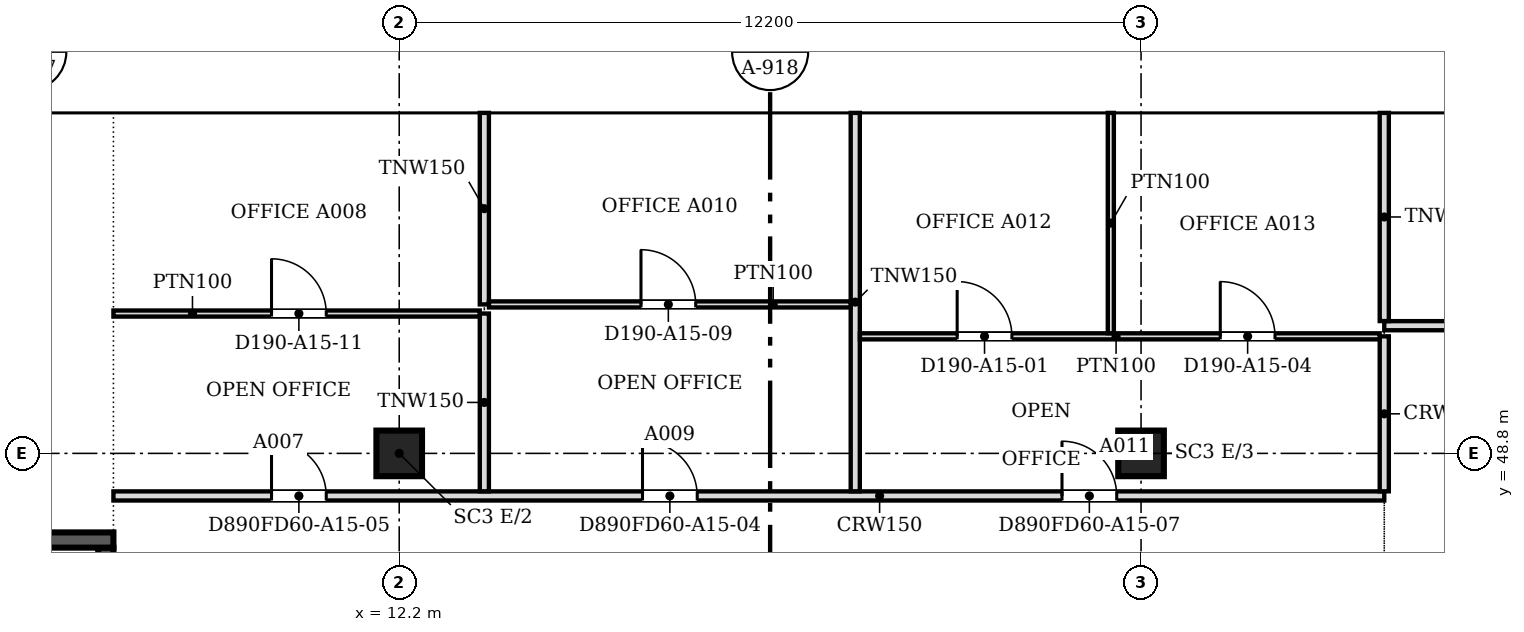
"""IFC4 building model, lengths in metres.
Left out: names, types, materials, properties, quantities, classifications, styles, units other than length and angle.
Written with IfcOpenShell. Run it as: python <this file> out.ifc"""

import sys

from ifc_helpers import new_model, si_unit, direction, frame, frame_2d, origin, origin_2d, place, context, subcontext, project, spatial, polyline, rectangle, outline, extrude, faceted_brep, source, transform, mapped, element, fill, save


model = new_model("IFC4")
c1 = context("Model", 3, precision=1e-05, world=origin(), true_north=direction((0.0, 1.0)))
c2 = subcontext(c1, "Body", "Model", "MODEL_VIEW")
j1 = project(units=[si_unit("LENGTHUNIT", "METRE"), si_unit("PLANEANGLEUNIT", "RADIAN")], contexts=[c1])
p1 = place(None, origin())
s1 = spatial("IfcSite", under=j1, at=p1, CompositionType="ELEMENT")
p2 = place(p1, origin())
s2 = spatial("IfcBuilding", under=s1, at=p2, CompositionType="ELEMENT")
p3 = place(p2, frame((0.0, 0.0, 170.6)))
s3 = spatial("IfcBuildingStorey", under=s2, at=p3, CompositionType="ELEMENT", Elevation=170.6)
for number, where, z_axis, x_axis in (
    (1, (12.2, 48.8, 0.0), (0.0, 0.0, 1.0), (1.0, 0.0, 0.0)),
    (2, (24.4, 48.8, 0.0), (0.0, 0.0, 1.0), (1.0, 0.0, 0.0)),
):
    element("IfcColumn", number, at=place(p3, frame(where, z_axis=z_axis, x_axis=x_axis)), inside=s3, PredefinedType="COLUMN", context=c2, shape_type="SweptSolid", body=[
        extrude(rectangle(XDim=0.75, YDim=0.75, at=origin_2d()), origin(), (0.0, 0.0, 1.0), 3.6),
    ])
m1 = source(origin(), c2, "Body", "SweptSolid", [
    extrude(outline(polyline([(3.05, 0.0), (6.1, 3.8), (3.05, 7.6), (0.0, 3.8), (3.05, 0.0)])), frame((0.0, 0.25, 0.0), z_axis=(0.0, -1.0, 0.0), x_axis=(1.0, 0.0, 0.0)), (0.0, 0.0, 1.0), 0.5),
])
p4 = place(p3, frame((33.55, 54.65, -3.8), z_axis=(0.0, 0.0, 1.0), x_axis=(-1.0, 0.0, 0.0)))
e3 = element("IfcWall", 3, at=p4, inside=s3, PredefinedType="SOLIDWALL", context=c2, shape_type="MappedRepresentation", body=[
    mapped(m1, transform((0.0, 0.0, 0.0), scale=1.0)),
])
m2 = source(origin(), c2, "Body", "SweptSolid", [
    extrude(outline(polyline([(3.05, 0.399), (5.78, 3.8), (3.05, 7.2), (0.321, 3.8), (3.05, 0.399)])), frame((0.0, 0.26, 0.0), z_axis=(0.0, -1.0, 0.0), x_axis=(1.0, 0.0, 0.0)), (0.0, 0.0, 1.0), 0.52),
])
p5 = place(p4, origin())
e4 = element("IfcOpeningElement", 4, at=p5, cuts=e3, PredefinedType="OPENING", context=c2, shape_type="MappedRepresentation", body=[
    mapped(m2, transform((0.0, 0.0, 0.0), scale=1.0)),
])
m3 = source(origin(), c2, "Body", "Brep", [
    faceted_brep([(3.05, -0.25, 0.0), (6.1, -0.25, 3.8), (6.1, -0.25, 3.8), (3.05, -0.25, 7.6), (0.0, -0.25, 3.8), (0.0, 0.25, 3.8), (3.05, 0.25, 7.6), (6.1, 0.25, 3.8), (6.1, 0.25, 3.8), (3.05, 0.25, 0.0)], [[[0, 1, 2, 3, 4]], [[5, 6, 7, 8, 9]], [[9, 8, 1, 0]], [[7, 6, 3, 2]], [[6, 5, 4, 3]], [[5, 9, 0, 4]], [[1, 8, 7, 2]]]),
])
p6 = place(p3, frame((27.45, 54.65, -3.8), z_axis=(0.0, 0.0, 1.0), x_axis=(-1.0, 0.0, 0.0)))
e5 = element("IfcWall", 5, at=p6, inside=s3, PredefinedType="SOLIDWALL", context=c2, shape_type="MappedRepresentation", body=[
    mapped(m3, transform((0.0, 0.0, 0.0), scale=1.0)),
])
p7 = place(p6, origin())
e6 = element("IfcOpeningElement", 6, at=p7, cuts=e5, PredefinedType="OPENING", context=c2, shape_type="MappedRepresentation", body=[
    mapped(m2, transform((0.0, 0.0, 0.0), scale=1.0)),
])
p8 = place(p3, frame((21.35, 54.65, -3.8), z_axis=(0.0, 0.0, 1.0), x_axis=(-1.0, 0.0, 0.0)))
e7 = element("IfcWall", 7, at=p8, inside=s3, PredefinedType="SOLIDWALL", context=c2, shape_type="MappedRepresentation", body=[
    mapped(m1, transform((0.0, 0.0, 0.0), scale=1.0)),
])
p9 = place(p8, origin())
e8 = element("IfcOpeningElement", 8, at=p9, cuts=e7, PredefinedType="OPENING", context=c2, shape_type="MappedRepresentation", body=[
    mapped(m2, transform((0.0, 0.0, 0.0), scale=1.0)),
])
p10 = place(p3, frame((15.25, 54.65, -3.8), z_axis=(0.0, 0.0, 1.0), x_axis=(-1.0, 0.0, 0.0)))
e9 = element("IfcWall", 9, at=p10, inside=s3, PredefinedType="SOLIDWALL", context=c2, shape_type="MappedRepresentation", body=[
    mapped(m1, transform((0.0, 0.0, 0.0), scale=1.0)),
])
p11 = place(p10, origin())
e10 = element("IfcOpeningElement", 10, at=p11, cuts=e9, PredefinedType="OPENING", context=c2, shape_type="MappedRepresentation", body=[
    mapped(m2, transform((0.0, 0.0, 0.0), scale=1.0)),
])
m4 = source(origin(), c2, "Body", "Brep", [
    faceted_brep([(3.003, -0.25, 0.0), (3.05, -0.25, 0.06), (3.05, -0.25, 7.54), (3.003, -0.25, 7.6), (0.0, -0.25, 3.8), (0.0, 0.25, 3.8), (2.957, 0.25, 7.541), (2.957, 0.25, 0.059), (3.003, 0.0, 0.0), (3.003, 0.0, 7.6)], [[[0, 1, 2, 3, 4]], [[5, 6, 7]], [[1, 0, 8]], [[9, 3, 2]], [[6, 5, 4, 3, 9]], [[5, 7, 8, 0, 4]], [[1, 8, 7, 6, 9, 2]]]),
])
p12 = place(p3, frame((9.15, 54.65, -3.8), z_axis=(0.0, 0.0, 1.0), x_axis=(-1.0, 0.0, 0.0)))
e11 = element("IfcWall", 11, at=p12, inside=s3, PredefinedType="SOLIDWALL", context=c2, shape_type="MappedRepresentation", body=[
    mapped(m4, transform((0.0, 0.0, 0.0), scale=1.0)),
])
m5 = source(origin(), c2, "Body", "SweptSolid", [
    extrude(outline(polyline([(2.803, 6.944), (0.319, 3.8), (2.803, 0.656), (2.803, 6.944)])), frame((0.0, 0.26, 0.0), z_axis=(0.0, -1.0, 0.0), x_axis=(1.0, 0.0, 0.0)), (0.0, 0.0, 1.0), 0.52),
])
p13 = place(p12, origin())
e12 = element("IfcOpeningElement", 12, at=p13, cuts=e11, PredefinedType="OPENING", context=c2, shape_type="MappedRepresentation", body=[
    mapped(m5, transform((0.0, 0.0, 0.0), scale=1.0)),
])
p14 = place(p2, frame((0.0, 0.0, 174.4)))
s4 = spatial("IfcBuildingStorey", under=s2, at=p14, CompositionType="ELEMENT", Elevation=174.4)
m6 = source(origin(), c2, "Body", "SweptSolid", [
    extrude(outline(polyline([(3.05, 0.0), (6.1, 3.8), (3.05, 7.6), (0.0, 3.8), (3.05, 0.0)])), frame((0.0, 0.25, 0.0), z_axis=(0.0, -1.0, 0.0), x_axis=(1.0, 0.0, 0.0)), (0.0, 0.0, 1.0), 0.5),
])
p15 = place(p14, frame((30.5, 54.65, -3.8), z_axis=(0.0, 0.0, 1.0), x_axis=(-1.0, 0.0, 0.0)))
e13 = element("IfcWall", 13, at=p15, inside=s4, PredefinedType="SOLIDWALL", context=c2, shape_type="MappedRepresentation", body=[
    mapped(m6, transform((0.0, 0.0, 0.0), scale=1.0)),
])
m7 = source(origin(), c2, "Body", "SweptSolid", [
    extrude(outline(polyline([(3.05, 0.399), (5.78, 3.8), (3.05, 7.2), (0.321, 3.8), (3.05, 0.399)])), frame((0.0, 0.26, 0.0), z_axis=(0.0, -1.0, 0.0), x_axis=(1.0, 0.0, 0.0)), (0.0, 0.0, 1.0), 0.52),
])
p16 = place(p15, origin())
e14 = element("IfcOpeningElement", 14, at=p16, cuts=e13, PredefinedType="OPENING", context=c2, shape_type="MappedRepresentation", body=[
    mapped(m7, transform((0.0, 0.0, 0.0), scale=1.0)),
])
m8 = source(origin(), c2, "Body", "Brep", [
    faceted_brep([(3.05, -0.25, 0.0), (6.1, -0.25, 3.8), (6.1, -0.25, 3.8), (3.05, -0.25, 7.6), (0.0, -0.25, 3.8), (0.0, 0.25, 3.8), (3.05, 0.25, 7.6), (6.1, 0.25, 3.8), (6.1, 0.25, 3.8), (3.05, 0.25, 0.0)], [[[0, 1, 2, 3, 4]], [[5, 6, 7, 8, 9]], [[9, 8, 1, 0]], [[7, 6, 3, 2]], [[6, 5, 4, 3]], [[5, 9, 0, 4]], [[1, 8, 7, 2]]]),
])
p17 = place(p14, frame((24.4, 54.65, -3.8), z_axis=(0.0, 0.0, 1.0), x_axis=(-1.0, 0.0, 0.0)))
e15 = element("IfcWall", 15, at=p17, inside=s4, PredefinedType="SOLIDWALL", context=c2, shape_type="MappedRepresentation", body=[
    mapped(m8, transform((0.0, 0.0, 0.0), scale=1.0)),
])
p18 = place(p17, origin())
e16 = element("IfcOpeningElement", 16, at=p18, cuts=e15, PredefinedType="OPENING", context=c2, shape_type="MappedRepresentation", body=[
    mapped(m7, transform((0.0, 0.0, 0.0), scale=1.0)),
])
p19 = place(p14, frame((18.3, 54.65, -3.8), z_axis=(0.0, 0.0, 1.0), x_axis=(-1.0, 0.0, 0.0)))
e17 = element("IfcWall", 17, at=p19, inside=s4, PredefinedType="SOLIDWALL", context=c2, shape_type="MappedRepresentation", body=[
    mapped(m6, transform((0.0, 0.0, 0.0), scale=1.0)),
])
p20 = place(p19, origin())
e18 = element("IfcOpeningElement", 18, at=p20, cuts=e17, PredefinedType="OPENING", context=c2, shape_type="MappedRepresentation", body=[
    mapped(m7, transform((0.0, 0.0, 0.0), scale=1.0)),
])
m9 = source(origin(), c2, "Body", "Brep", [
    faceted_brep([(3.05, -0.25, 0.0), (6.053, -0.25, 3.8), (3.05, -0.25, 7.6), (0.0, -0.25, 3.8), (0.0, 0.25, 3.8), (3.05, 0.25, 7.6), (6.007, 0.25, 3.859), (6.007, 0.25, 3.741), (3.05, 0.25, 0.0), (6.053, 0.0, 3.8)], [[[0, 1, 2, 3]], [[4, 5, 6, 7, 8]], [[8, 7, 9, 1, 0]], [[6, 5, 2, 1, 9]], [[5, 4, 3, 2]], [[4, 8, 0, 3]], [[9, 7, 6]]]),
])
p21 = place(p14, frame((12.2, 54.65, -3.8), z_axis=(0.0, 0.0, 1.0), x_axis=(-1.0, 0.0, 0.0)))
e19 = element("IfcWall", 19, at=p21, inside=s4, PredefinedType="SOLIDWALL", context=c2, shape_type="MappedRepresentation", body=[
    mapped(m9, transform((0.0, 0.0, 0.0), scale=1.0)),
])
m10 = source(origin(), c2, "Body", "SweptSolid", [
    extrude(outline(polyline([(3.049, 0.401), (5.735, 3.8), (3.049, 7.199), (0.321, 3.8), (3.049, 0.401)])), frame((0.0, 0.26, 0.0), z_axis=(0.0, -1.0, 0.0), x_axis=(1.0, 0.0, 0.0)), (0.0, 0.0, 1.0), 0.52),
])
p22 = place(p21, origin())
e20 = element("IfcOpeningElement", 20, at=p22, cuts=e19, PredefinedType="OPENING", context=c2, shape_type="MappedRepresentation", body=[
    mapped(m10, transform((0.0, 0.0, 0.0), scale=1.0)),
])
p23 = place(p3, frame((3.6, 47.375, 0.0), z_axis=(0.0, 0.0, 1.0), x_axis=(1.0, 0.0, 0.0)))
e21 = element("IfcWall", 21, at=p23, inside=s3, PredefinedType="SOLIDWALL", context=c2, shape_type="SweptSolid", body=[
    extrude(rectangle(XDim=3.9, YDim=0.25, at=frame_2d((1.95, 0.0))), origin(), (0.0, 0.0, 1.0), 3.8),
])
p24 = place(p3, frame((7.375, 47.25, 0.0), z_axis=(0.0, 0.0, 1.0), x_axis=(0.0, -1.0, 0.0)))
e22 = element("IfcWall", 22, at=p24, inside=s3, PredefinedType="SOLIDWALL", context=c2, shape_type="SweptSolid", body=[
    extrude(rectangle(XDim=8.0, YDim=0.25, at=frame_2d((4.0, 0.0))), origin(), (0.0, 0.0, 1.0), 3.8),
])
m11 = source(origin(), c2, "Body", "SweptSolid", [
    extrude(rectangle(XDim=1.2, YDim=2.1, at=frame_2d((0.6, 1.05))), frame((0.0, 0.135, 0.0), z_axis=(0.0, -1.0, 0.0), x_axis=(1.0, 0.0, 0.0)), (0.0, 0.0, 1.0), 0.27),
])
p25 = place(p24, frame((0.15, 0.0, 0.0)))
e23 = element("IfcOpeningElement", 23, at=p25, cuts=e22, PredefinedType="OPENING", context=c2, shape_type="MappedRepresentation", body=[
    mapped(m11, transform((0.0, 0.0, 0.0), scale=1.0)),
])
p26 = place(p3, frame((7.5, 48.1, 0.0), z_axis=(0.0, 0.0, 1.0), x_axis=(1.0, 0.0, 0.0)))
e24 = element("IfcWall", 24, at=p26, inside=s3, PredefinedType="PARTITIONING", context=c2, shape_type="SweptSolid", body=[
    extrude(rectangle(XDim=20.9, YDim=0.15, at=frame_2d((10.45, 0.0))), origin(), (0.0, 0.0, 1.0), 3.067),
])
m12 = source(origin(), c2, "Body", "SweptSolid", [
    extrude(rectangle(XDim=0.9, YDim=2.1, at=frame_2d((0.45, 1.05))), frame((0.0, 0.085, 0.0), z_axis=(0.0, -1.0, 0.0), x_axis=(1.0, 0.0, 0.0)), (0.0, 0.0, 1.0), 0.17),
])
p27 = place(p26, frame((8.701, 0.0, 0.0)))
e25 = element("IfcOpeningElement", 25, at=p27, cuts=e24, PredefinedType="OPENING", context=c2, shape_type="MappedRepresentation", body=[
    mapped(m12, transform((0.0, 0.0, 0.0), scale=1.0)),
])
p28 = place(p26, frame((2.6, 0.0, 0.0)))
e26 = element("IfcOpeningElement", 26, at=p28, cuts=e24, PredefinedType="OPENING", context=c2, shape_type="MappedRepresentation", body=[
    mapped(m12, transform((0.0, 0.0, 0.0), scale=1.0)),
])
p29 = place(p26, frame((15.6, 0.0, 0.0)))
e27 = element("IfcOpeningElement", 27, at=p29, cuts=e24, PredefinedType="OPENING", context=c2, shape_type="MappedRepresentation", body=[
    mapped(m12, transform((0.0, 0.0, 0.0), scale=1.0)),
])
p30 = place(p3, frame((13.6, 48.176, 0.0), z_axis=(0.0, 0.0, 1.0), x_axis=(0.0, 1.0, 0.0)))
e28 = element("IfcWall", 28, at=p30, inside=s3, PredefinedType="PARTITIONING", context=c2, shape_type="SweptSolid", body=[
    extrude(rectangle(XDim=2.924, YDim=0.15, at=frame_2d((1.462, 0.0))), origin(), (0.0, 0.0, 1.0), 3.067),
])
p31 = place(p3, frame((19.7, 48.176, 0.0), z_axis=(0.0, 0.0, 1.0), x_axis=(0.0, 1.0, 0.0)))
e29 = element("IfcWall", 29, at=p31, inside=s3, PredefinedType="PARTITIONING", context=c2, shape_type="SweptSolid", body=[
    extrude(rectangle(XDim=6.224, YDim=0.15, at=frame_2d((3.112, 0.0))), origin(), (0.0, 0.0, 1.0), 3.067),
])
p32 = place(p3, frame((28.4, 48.176, 0.0), z_axis=(0.0, 0.0, 1.0), x_axis=(0.0, 1.0, 0.0)))
e30 = element("IfcWall", 30, at=p32, inside=s3, PredefinedType="PARTITIONING", context=c2, shape_type="SweptSolid", body=[
    extrude(rectangle(XDim=2.549, YDim=0.15, at=frame_2d((1.274, 0.0))), origin(), (0.0, 0.0, 1.0), 3.067),
])
p33 = place(p3, frame((19.776, 50.725, 0.0), z_axis=(0.0, 0.0, 1.0), x_axis=(1.0, 0.0, 0.0)))
e31 = element("IfcWall", 31, at=p33, inside=s3, PredefinedType="PARTITIONING", context=c2, shape_type="SweptSolid", body=[
    extrude(rectangle(XDim=8.548, YDim=0.1, at=frame_2d((4.274, 0.0))), origin(), (0.0, 0.0, 1.0), 3.067),
])
m13 = source(origin(), c2, "Body", "SweptSolid", [
    extrude(rectangle(XDim=0.9, YDim=2.1, at=frame_2d((0.45, 1.05))), frame((0.0, 0.06, 0.0), z_axis=(0.0, -1.0, 0.0), x_axis=(1.0, 0.0, 0.0)), (0.0, 0.0, 1.0), 0.12),
])
p34 = place(p33, frame((1.6, 0.0, 0.0)))
e32 = element("IfcOpeningElement", 32, at=p34, cuts=e31, PredefinedType="OPENING", context=c2, shape_type="MappedRepresentation", body=[
    mapped(m13, transform((0.0, 0.0, 0.0), scale=1.0)),
])
p35 = place(p33, frame((5.927, 0.0, 0.0)))
e33 = element("IfcOpeningElement", 33, at=p35, cuts=e31, PredefinedType="OPENING", context=c2, shape_type="MappedRepresentation", body=[
    mapped(m13, transform((0.0, 0.0, 0.0), scale=1.0)),
])
p36 = place(p3, frame((23.903, 50.776, 0.0), z_axis=(0.0, 0.0, 1.0), x_axis=(0.0, 1.0, 0.0)))
e34 = element("IfcWall", 34, at=p36, inside=s3, PredefinedType="PARTITIONING", context=c2, shape_type="SweptSolid", body=[
    extrude(rectangle(XDim=3.624, YDim=0.1, at=frame_2d((1.812, 0.0))), origin(), (0.0, 0.0, 1.0), 3.067),
])
p37 = place(p3, frame((28.4, 50.9, 0.0), z_axis=(0.0, 0.0, 1.0), x_axis=(1.0, 0.0, 0.0)))
e35 = element("IfcWall", 35, at=p37, inside=s3, PredefinedType="PARTITIONING", context=c2, shape_type="SweptSolid", body=[
    extrude(rectangle(XDim=31.254, YDim=0.15, at=frame_2d((15.627, 0.0))), origin(), (0.0, 0.0, 1.0), 3.067),
])
p38 = place(p37, frame((7.0, 0.0, 0.0)))
e36 = element("IfcOpeningElement", 36, at=p38, cuts=e35, PredefinedType="OPENING", context=c2, shape_type="MappedRepresentation", body=[
    mapped(m12, transform((0.0, 0.0, 0.0), scale=1.0)),
])
p39 = place(p37, frame((22.7, 0.0, 0.0)))
e37 = element("IfcOpeningElement", 37, at=p39, cuts=e35, PredefinedType="OPENING", context=c2, shape_type="MappedRepresentation", body=[
    mapped(m12, transform((0.0, 0.0, 0.0), scale=1.0)),
])
p40 = place(p3, frame((28.4, 50.976, 0.0), z_axis=(0.0, 0.0, 1.0), x_axis=(0.0, 1.0, 0.0)))
e38 = element("IfcWall", 38, at=p40, inside=s3, PredefinedType="PARTITIONING", context=c2, shape_type="SweptSolid", body=[
    extrude(rectangle(XDim=3.424, YDim=0.15, at=frame_2d((1.712, 0.0))), origin(), (0.0, 0.0, 1.0), 3.067),
])
p41 = place(p3, frame((7.5, 51.1, 0.0), z_axis=(0.0, 0.0, 1.0), x_axis=(1.0, 0.0, 0.0)))
e39 = element("IfcWall", 39, at=p41, inside=s3, PredefinedType="PARTITIONING", context=c2, shape_type="SweptSolid", body=[
    extrude(rectangle(XDim=6.024, YDim=0.1, at=frame_2d((3.012, 0.0))), origin(), (0.0, 0.0, 1.0), 3.067),
])
p42 = place(p41, frame((2.6, 0.0, 0.0)))
e40 = element("IfcOpeningElement", 40, at=p42, cuts=e39, PredefinedType="OPENING", context=c2, shape_type="MappedRepresentation", body=[
    mapped(m13, transform((0.0, 0.0, 0.0), scale=1.0)),
])
p43 = place(p3, frame((13.6, 51.25, 0.0), z_axis=(0.0, 0.0, 1.0), x_axis=(0.0, 1.0, 0.0)))
e41 = element("IfcWall", 41, at=p43, inside=s3, PredefinedType="PARTITIONING", context=c2, shape_type="SweptSolid", body=[
    extrude(rectangle(XDim=3.15, YDim=0.15, at=frame_2d((1.575, 0.0))), origin(), (0.0, 0.0, 1.0), 3.067),
])
p44 = place(p3, frame((13.676, 51.25, 0.0), z_axis=(0.0, 0.0, 1.0), x_axis=(1.0, 0.0, 0.0)))
e42 = element("IfcWall", 42, at=p44, inside=s3, PredefinedType="PARTITIONING", context=c2, shape_type="SweptSolid", body=[
    extrude(rectangle(XDim=5.948, YDim=0.1, at=frame_2d((2.974, 0.0))), origin(), (0.0, 0.0, 1.0), 3.067),
])
p45 = place(p44, frame((2.5, 0.0, 0.0)))
e43 = element("IfcOpeningElement", 43, at=p45, cuts=e42, PredefinedType="OPENING", context=c2, shape_type="MappedRepresentation", body=[
    mapped(m13, transform((0.0, 0.0, 0.0), scale=1.0)),
])
m14 = source(origin(), c2, "Body", "SweptSolid", [
    extrude(rectangle(XDim=0.9, YDim=2.1, at=frame_2d((0.45, 1.05))), frame((0.0, 0.025, 0.0), z_axis=(0.0, -1.0, 0.0), x_axis=(1.0, 0.0, 0.0)), (0.0, 0.0, 1.0), 0.05),
])
p46 = place(p34, origin())
e44 = element("IfcDoor", 44, at=p46, inside=s3, OperationType="SINGLE_SWING_LEFT", PredefinedType="DOOR", context=c2, shape_type="MappedRepresentation", body=[
    mapped(m14, transform((0.0, 0.0, 0.0), scale=1.0)),
])
fill(e32, e44)
p47 = place(p35, origin())
e45 = element("IfcDoor", 45, at=p47, inside=s3, OperationType="SINGLE_SWING_LEFT", PredefinedType="DOOR", context=c2, shape_type="MappedRepresentation", body=[
    mapped(m14, transform((0.0, 0.0, 0.0), scale=1.0)),
])
fill(e33, e45)
p48 = place(p45, origin())
e46 = element("IfcDoor", 46, at=p48, inside=s3, OperationType="SINGLE_SWING_LEFT", PredefinedType="DOOR", context=c2, shape_type="MappedRepresentation", body=[
    mapped(m14, transform((0.0, 0.0, 0.0), scale=1.0)),
])
fill(e43, e46)
p49 = place(p42, origin())
e47 = element("IfcDoor", 47, at=p49, inside=s3, OperationType="SINGLE_SWING_LEFT", PredefinedType="DOOR", context=c2, shape_type="MappedRepresentation", body=[
    mapped(m14, transform((0.0, 0.0, 0.0), scale=1.0)),
])
fill(e40, e47)
p50 = place(p27, origin())
e48 = element("IfcDoor", 48, at=p50, inside=s3, OperationType="SINGLE_SWING_LEFT", PredefinedType="DOOR", context=c2, shape_type="MappedRepresentation", body=[
    mapped(m14, transform((0.0, 0.0, 0.0), scale=1.0)),
])
fill(e25, e48)
p51 = place(p28, origin())
e49 = element("IfcDoor", 49, at=p51, inside=s3, OperationType="SINGLE_SWING_LEFT", PredefinedType="DOOR", context=c2, shape_type="MappedRepresentation", body=[
    mapped(m14, transform((0.0, 0.0, 0.0), scale=1.0)),
])
fill(e26, e49)
p52 = place(p29, origin())
e50 = element("IfcDoor", 50, at=p52, inside=s3, OperationType="SINGLE_SWING_LEFT", PredefinedType="DOOR", context=c2, shape_type="MappedRepresentation", body=[
    mapped(m14, transform((0.0, 0.0, 0.0), scale=1.0)),
])
fill(e27, e50)
save(model, sys.argv[1])
